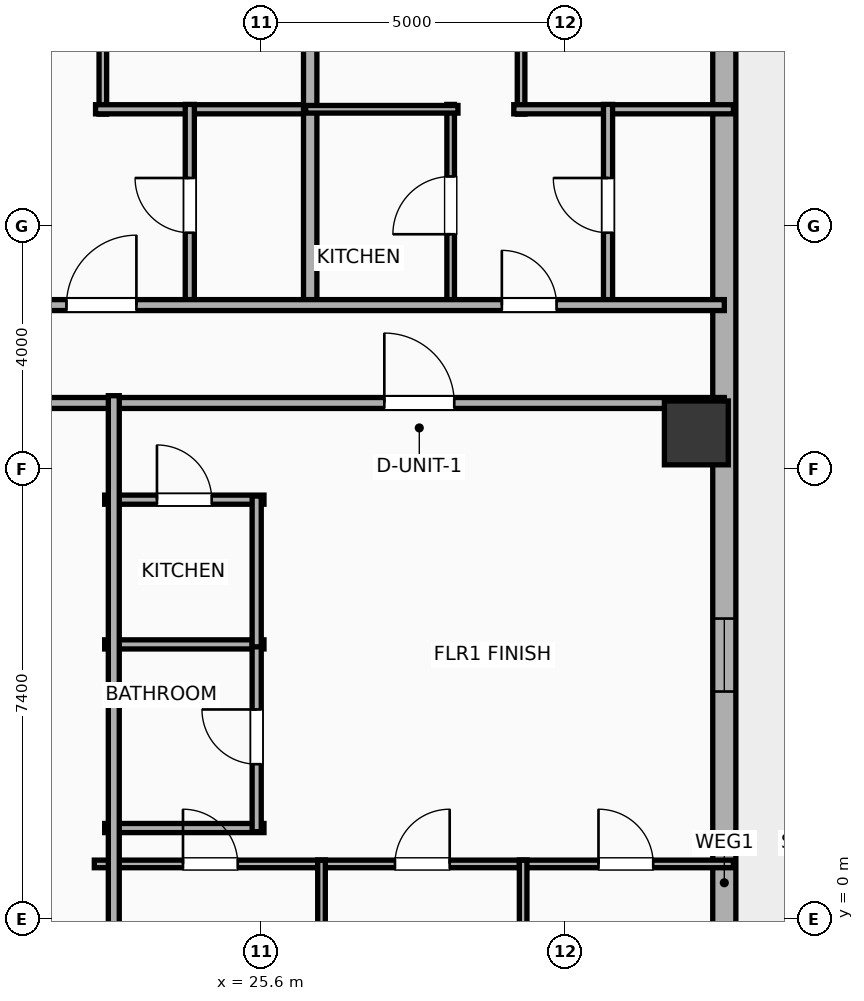
"""IFC4 building model, lengths in metres.
Left out: names, types, materials, properties, quantities, classifications, styles, units other than length and angle.
Written with IfcOpenShell. Run it as: python <this file> out.ifc"""

import sys

from ifc_helpers import new_model, si_unit, direction, frame, frame_2d, origin, origin_2d, place, context, subcontext, project, spatial, rectangle, hollow_rectangle, extrude, element, fill, save


model = new_model("IFC4")
c1 = context("Model", 3, precision=1e-05, world=origin(), true_north=direction((0.0, 1.0)))
c2 = subcontext(c1, "Body", "Model", "MODEL_VIEW")
j1 = project(units=[si_unit("LENGTHUNIT", "METRE"), si_unit("PLANEANGLEUNIT", "RADIAN")], contexts=[c1])
p1 = place(None, origin())
s1 = spatial("IfcSite", under=j1, at=p1, CompositionType="ELEMENT")
p2 = place(p1, origin())
s2 = spatial("IfcBuilding", under=s1, at=p2, CompositionType="ELEMENT")
p3 = place(p2, frame((0.0, 0.0, 113.1)))
s3 = spatial("IfcBuildingStorey", under=s2, at=p3, CompositionType="ELEMENT", Elevation=113.1)
p4 = place(p3, frame((32.75, 7.998, 0.0), z_axis=(0.0, 0.0, 1.0), x_axis=(1.0, 0.0, 0.0)))
e1 = element("IfcColumn", 1, at=p4, inside=s3, PredefinedType="COLUMN", context=c2, shape_type="SweptSolid", body=[
    extrude(hollow_rectangle(XDim=1.05, YDim=1.05, WallThickness=0.036, at=origin_2d()), origin(), (0.0, 0.0, 1.0), 3.9),
])
p5 = place(p3, frame((33.21, 17.781, 0.0), z_axis=(0.0, 0.0, 1.0), x_axis=(0.0, -1.0, 0.0)))
e2 = element("IfcWall", 2, at=p5, inside=s3, PredefinedType="ELEMENTEDWALL", context=c2, shape_type="SweptSolid", body=[
    extrude(rectangle(XDim=34.363, YDim=0.38, at=frame_2d((17.181, 0.0))), origin(), (0.0, 0.0, 1.0), 3.65),
])
p6 = place(p5, frame((31.687, 0.0, 0.75)))
e3 = element("IfcOpeningElement", 3, at=p6, cuts=e2, PredefinedType="OPENING", context=c2, shape_type="SweptSolid", body=[
    extrude(rectangle(XDim=1.2, YDim=2.05, at=frame_2d((0.6, 1.025))), frame((0.0, 0.2, 0.0), z_axis=(0.0, -1.0, 0.0), x_axis=(1.0, 0.0, 0.0)), (0.0, 0.0, 1.0), 0.4),
])
p7 = place(p5, frame((12.836, 0.0, 0.75)))
e4 = element("IfcOpeningElement", 4, at=p7, cuts=e2, PredefinedType="OPENING", context=c2, shape_type="SweptSolid", body=[
    extrude(rectangle(XDim=1.2, YDim=2.05, at=frame_2d((0.6, 1.025))), frame((0.0, 0.2, 0.0), z_axis=(0.0, -1.0, 0.0), x_axis=(1.0, 0.0, 0.0)), (0.0, 0.0, 1.0), 0.4),
])
p8 = place(p5, frame((21.386, 0.0, 0.75)))
e5 = element("IfcOpeningElement", 5, at=p8, cuts=e2, PredefinedType="OPENING", context=c2, shape_type="SweptSolid", body=[
    extrude(rectangle(XDim=1.2, YDim=2.05, at=frame_2d((0.6, 1.025))), frame((0.0, 0.2, 0.0), z_axis=(0.0, -1.0, 0.0), x_axis=(1.0, 0.0, 0.0)), (0.0, 0.0, 1.0), 0.4),
])
p9 = place(p3, frame((9.88, 8.49, 0.0), z_axis=(0.0, 0.0, 1.0), x_axis=(1.0, 0.0, 0.0)))
e6 = element("IfcWall", 6, at=p9, inside=s3, PredefinedType="PARTITIONING", context=c2, shape_type="SweptSolid", body=[
    extrude(rectangle(XDim=23.33, YDim=0.18, at=frame_2d((11.665, 0.0))), origin(), (0.0, 0.0, 1.0), 3.65),
])
p10 = place(p9, frame((17.739, 0.0, 0.0)))
e7 = element("IfcOpeningElement", 7, at=p10, cuts=e6, PredefinedType="OPENING", context=c2, shape_type="SweptSolid", body=[
    extrude(rectangle(XDim=1.15, YDim=2.05, at=frame_2d((0.575, 1.025))), frame((0.0, 0.1, 0.0), z_axis=(0.0, -1.0, 0.0), x_axis=(1.0, 0.0, 0.0)), (0.0, 0.0, 1.0), 0.2),
])
p11 = place(p3, frame((22.99, 13.24, 0.0), z_axis=(0.0, 0.0, 1.0), x_axis=(0.0, 1.0, 0.0)))
e8 = element("IfcWall", 8, at=p11, inside=s3, PredefinedType="PARTITIONING", context=c2, shape_type="SweptSolid", body=[
    extrude(rectangle(XDim=8.52, YDim=0.125, at=frame_2d((4.26, 0.0))), origin(), (0.0, 0.0, 1.0), 3.65),
])
p12 = place(p11, frame((1.595, 0.0, 0.0)))
e9 = element("IfcOpeningElement", 9, at=p12, cuts=e8, PredefinedType="OPENING", context=c2, shape_type="SweptSolid", body=[
    extrude(rectangle(XDim=0.9, YDim=2.05, at=frame_2d((0.45, 1.025))), frame((0.0, 0.073, 0.0), z_axis=(0.0, -1.0, 0.0), x_axis=(1.0, 0.0, 0.0)), (0.0, 0.0, 1.0), 0.145),
])
p13 = place(p3, frame((22.87, 13.32, 0.0), z_axis=(0.0, 0.0, 1.0), x_axis=(1.0, 0.0, 0.0)))
e10 = element("IfcWall", 10, at=p13, inside=s3, PredefinedType="PLUMBINGWALL", context=c2, shape_type="SweptSolid", body=[
    extrude(rectangle(XDim=3.605, YDim=0.15, at=frame_2d((1.802, 0.0))), origin(), (0.0, 0.0, 1.0), 3.65),
])
p14 = place(p3, frame((24.42, 10.08, 0.0), z_axis=(0.0, 0.0, 1.0), x_axis=(0.0, 1.0, 0.0)))
e11 = element("IfcWall", 11, at=p14, inside=s3, PredefinedType="PLUMBINGWALL", context=c2, shape_type="SweptSolid", body=[
    extrude(rectangle(XDim=3.32, YDim=0.15, at=frame_2d((1.66, 0.0))), origin(), (0.0, 0.0, 1.0), 3.65),
])
p15 = place(p14, frame((1.21, 0.0, 0.0)))
e12 = element("IfcOpeningElement", 12, at=p15, cuts=e11, PredefinedType="OPENING", context=c2, shape_type="SweptSolid", body=[
    extrude(rectangle(XDim=0.9, YDim=2.05, at=frame_2d((0.45, 1.025))), frame((0.0, 0.085, 0.0), z_axis=(0.0, -1.0, 0.0), x_axis=(1.0, 0.0, 0.0)), (0.0, 0.0, 1.0), 0.17),
])
p16 = place(p3, frame((26.4, 10.02, 0.0), z_axis=(0.0, 0.0, 1.0), x_axis=(0.0, 1.0, 0.0)))
e13 = element("IfcWall", 13, at=p16, inside=s3, PredefinedType="PARTITIONING", context=c2, shape_type="SweptSolid", body=[
    extrude(rectangle(XDim=11.59, YDim=0.22, at=frame_2d((5.795, 0.0))), origin(), (0.0, 0.0, 1.0), 3.65),
])
p17 = place(p3, frame((29.868, 13.24, 0.0), z_axis=(0.0, 0.0, 1.0), x_axis=(0.0, 1.0, 0.0)))
e14 = element("IfcWall", 14, at=p17, inside=s3, PredefinedType="PARTITIONING", context=c2, shape_type="SweptSolid", body=[
    extrude(rectangle(XDim=8.426, YDim=0.125, at=frame_2d((4.213, 0.0))), origin(), (0.0, 0.0, 1.0), 3.65),
])
p18 = place(p17, frame((1.572, 0.0, 0.0)))
e15 = element("IfcOpeningElement", 15, at=p18, cuts=e14, PredefinedType="OPENING", context=c2, shape_type="SweptSolid", body=[
    extrude(rectangle(XDim=0.9, YDim=2.05, at=frame_2d((0.45, 1.025))), frame((0.0, 0.073, 0.0), z_axis=(0.0, -1.0, 0.0), x_axis=(1.0, 0.0, 0.0)), (0.0, 0.0, 1.0), 0.145),
])
p19 = place(p3, frame((29.748, 13.32, 0.0), z_axis=(0.0, 0.0, 1.0), x_axis=(1.0, 0.0, 0.0)))
e16 = element("IfcWall", 16, at=p19, inside=s3, PredefinedType="PLUMBINGWALL", context=c2, shape_type="SweptSolid", body=[
    extrude(rectangle(XDim=3.612, YDim=0.15, at=frame_2d((1.806, 0.0))), origin(), (0.0, 0.0, 1.0), 3.65),
])
p20 = place(p3, frame((28.71, 10.08, 0.0), z_axis=(0.0, 0.0, 1.0), x_axis=(0.0, 1.0, 0.0)))
e17 = element("IfcWall", 17, at=p20, inside=s3, PredefinedType="PARTITIONING", context=c2, shape_type="SweptSolid", body=[
    extrude(rectangle(XDim=3.32, YDim=0.125, at=frame_2d((1.66, 0.0))), origin(), (0.0, 0.0, 1.0), 3.65),
])
p21 = place(p20, frame((1.185, 0.0, 0.0)))
e18 = element("IfcOpeningElement", 18, at=p21, cuts=e17, PredefinedType="OPENING", context=c2, shape_type="SweptSolid", body=[
    extrude(rectangle(XDim=0.95, YDim=2.05, at=frame_2d((0.475, 1.025))), frame((0.0, 0.073, 0.0), z_axis=(0.0, -1.0, 0.0), x_axis=(1.0, 0.0, 0.0)), (0.0, 0.0, 1.0), 0.145),
])
p22 = place(p3, frame((26.325, 13.32, 0.0), z_axis=(0.0, 0.0, 1.0), x_axis=(1.0, 0.0, 0.0)))
e19 = element("IfcWall", 19, at=p22, inside=s3, PredefinedType="PARTITIONING", context=c2, shape_type="SweptSolid", body=[
    extrude(rectangle(XDim=2.505, YDim=0.125, at=frame_2d((1.252, 0.0))), origin(), (0.0, 0.0, 1.0), 3.65),
])
p23 = place(p3, frame((31.298, 10.08, 0.0), z_axis=(0.0, 0.0, 1.0), x_axis=(0.0, 1.0, 0.0)))
e20 = element("IfcWall", 20, at=p23, inside=s3, PredefinedType="PLUMBINGWALL", context=c2, shape_type="SweptSolid", body=[
    extrude(rectangle(XDim=3.32, YDim=0.15, at=frame_2d((1.66, 0.0))), origin(), (0.0, 0.0, 1.0), 3.65),
])
p24 = place(p23, frame((1.21, 0.0, 0.0)))
e21 = element("IfcOpeningElement", 21, at=p24, cuts=e20, PredefinedType="OPENING", context=c2, shape_type="SweptSolid", body=[
    extrude(rectangle(XDim=0.9, YDim=2.05, at=frame_2d((0.45, 1.025))), frame((0.0, 0.085, 0.0), z_axis=(0.0, -1.0, 0.0), x_axis=(1.0, 0.0, 0.0)), (0.0, 0.0, 1.0), 0.17),
])
p25 = place(p3, frame((-29.21, 10.1, 0.0), z_axis=(0.0, 0.0, 1.0), x_axis=(1.0, 0.0, 0.0)))
e22 = element("IfcWall", 22, at=p25, inside=s3, PredefinedType="PARTITIONING", context=c2, shape_type="SweptSolid", body=[
    extrude(rectangle(XDim=62.42, YDim=0.18, at=frame_2d((31.21, 0.0))), origin(), (0.0, 0.0, 1.0), 3.65),
])
p26 = place(p25, frame((2.74, 0.0, 0.0)))
e23 = element("IfcOpeningElement", 23, at=p26, cuts=e22, PredefinedType="OPENING", context=c2, shape_type="SweptSolid", body=[
    extrude(rectangle(XDim=0.9, YDim=2.05, at=frame_2d((0.45, 1.025))), frame((0.0, 0.1, 0.0), z_axis=(0.0, -1.0, 0.0), x_axis=(1.0, 0.0, 0.0)), (0.0, 0.0, 1.0), 0.2),
])
p27 = place(p25, frame((9.868, 0.0, 0.0)))
e24 = element("IfcOpeningElement", 24, at=p27, cuts=e22, PredefinedType="OPENING", context=c2, shape_type="SweptSolid", body=[
    extrude(rectangle(XDim=1.15, YDim=2.05, at=frame_2d((0.575, 1.025))), frame((0.0, 0.1, 0.0), z_axis=(0.0, -1.0, 0.0), x_axis=(1.0, 0.0, 0.0)), (0.0, 0.0, 1.0), 0.2),
])
p28 = place(p25, frame((15.598, 0.0, 0.0)))
e25 = element("IfcOpeningElement", 25, at=p28, cuts=e22, PredefinedType="OPENING", context=c2, shape_type="SweptSolid", body=[
    extrude(rectangle(XDim=1.15, YDim=2.05, at=frame_2d((0.575, 1.025))), frame((0.0, 0.1, 0.0), z_axis=(0.0, -1.0, 0.0), x_axis=(1.0, 0.0, 0.0)), (0.0, 0.0, 1.0), 0.2),
])
p29 = place(p25, frame((22.801, 0.0, 0.0)))
e26 = element("IfcOpeningElement", 26, at=p29, cuts=e22, PredefinedType="OPENING", context=c2, shape_type="SweptSolid", body=[
    extrude(rectangle(XDim=1.15, YDim=2.05, at=frame_2d((0.575, 1.025))), frame((0.0, 0.1, 0.0), z_axis=(0.0, -1.0, 0.0), x_axis=(1.0, 0.0, 0.0)), (0.0, 0.0, 1.0), 0.2),
])
p30 = place(p25, frame((29.998, 0.0, 0.0)))
e27 = element("IfcOpeningElement", 27, at=p30, cuts=e22, PredefinedType="OPENING", context=c2, shape_type="SweptSolid", body=[
    extrude(rectangle(XDim=1.15, YDim=2.05, at=frame_2d((0.575, 1.025))), frame((0.0, 0.1, 0.0), z_axis=(0.0, -1.0, 0.0), x_axis=(1.0, 0.0, 0.0)), (0.0, 0.0, 1.0), 0.2),
])
p31 = place(p25, frame((37.202, 0.0, 0.0)))
e28 = element("IfcOpeningElement", 28, at=p31, cuts=e22, PredefinedType="OPENING", context=c2, shape_type="SweptSolid", body=[
    extrude(rectangle(XDim=1.15, YDim=2.05, at=frame_2d((0.575, 1.025))), frame((0.0, 0.1, 0.0), z_axis=(0.0, -1.0, 0.0), x_axis=(1.0, 0.0, 0.0)), (0.0, 0.0, 1.0), 0.2),
])
p32 = place(p25, frame((44.399, 0.0, 0.0)))
e29 = element("IfcOpeningElement", 29, at=p32, cuts=e22, PredefinedType="OPENING", context=c2, shape_type="SweptSolid", body=[
    extrude(rectangle(XDim=1.15, YDim=2.05, at=frame_2d((0.575, 1.025))), frame((0.0, 0.1, 0.0), z_axis=(0.0, -1.0, 0.0), x_axis=(1.0, 0.0, 0.0)), (0.0, 0.0, 1.0), 0.2),
])
p33 = place(p25, frame((51.602, 0.0, 0.0)))
e30 = element("IfcOpeningElement", 30, at=p33, cuts=e22, PredefinedType="OPENING", context=c2, shape_type="SweptSolid", body=[
    extrude(rectangle(XDim=1.15, YDim=2.05, at=frame_2d((0.575, 1.025))), frame((0.0, 0.1, 0.0), z_axis=(0.0, -1.0, 0.0), x_axis=(1.0, 0.0, 0.0)), (0.0, 0.0, 1.0), 0.2),
])
p34 = place(p25, frame((58.762, 0.0, 0.0)))
e31 = element("IfcOpeningElement", 31, at=p34, cuts=e22, PredefinedType="OPENING", context=c2, shape_type="SweptSolid", body=[
    extrude(rectangle(XDim=0.9, YDim=2.05, at=frame_2d((0.45, 1.025))), frame((0.0, 0.1, 0.0), z_axis=(0.0, -1.0, 0.0), x_axis=(1.0, 0.0, 0.0)), (0.0, 0.0, 1.0), 0.2),
])
p35 = place(p3, frame((23.02, 6.9, 0.0), z_axis=(0.0, 0.0, 1.0), x_axis=(1.0, 0.0, 0.0)))
e32 = element("IfcWall", 32, at=p35, inside=s3, PredefinedType="PLUMBINGWALL", context=c2, shape_type="SweptSolid", body=[
    extrude(rectangle(XDim=2.62, YDim=0.15, at=frame_2d((1.31, 0.0))), origin(), (0.0, 0.0, 1.0), 3.65),
])
p36 = place(p35, frame((0.86, 0.0, 0.0)))
e33 = element("IfcOpeningElement", 33, at=p36, cuts=e32, PredefinedType="OPENING", context=c2, shape_type="SweptSolid", body=[
    extrude(rectangle(XDim=0.9, YDim=2.05, at=frame_2d((0.45, 1.025))), frame((0.0, 0.085, 0.0), z_axis=(0.0, -1.0, 0.0), x_axis=(1.0, 0.0, 0.0)), (0.0, 0.0, 1.0), 0.17),
])
for number, where, z_axis, x_axis in (
    (34, (23.02, 4.52, 0.0), (0.0, 0.0, 1.0), (1.0, 0.0, 0.0)),
    (35, (23.02, 1.5, 0.0), (0.0, 0.0, 1.0), (1.0, 0.0, 0.0)),
):
    element("IfcWall", number, at=place(p3, frame(where, z_axis=z_axis, x_axis=x_axis)), inside=s3, PredefinedType="PLUMBINGWALL", context=c2, shape_type="SweptSolid", body=[
        extrude(rectangle(XDim=2.62, YDim=0.15, at=frame_2d((1.31, 0.0))), origin(), (0.0, 0.0, 1.0), 3.65),
    ])
p37 = place(p3, frame((25.52, 1.44, 0.0), z_axis=(0.0, 0.0, 1.0), x_axis=(0.0, 1.0, 0.0)))
e36 = element("IfcWall", 36, at=p37, inside=s3, PredefinedType="PLUMBINGWALL", context=c2, shape_type="SweptSolid", body=[
    extrude(rectangle(XDim=3.12, YDim=0.15, at=frame_2d((1.56, 0.0))), origin(), (0.0, 0.0, 1.0), 3.65),
])
p38 = place(p37, frame((1.11, 0.0, 0.0)))
e37 = element("IfcOpeningElement", 37, at=p38, cuts=e36, PredefinedType="OPENING", context=c2, shape_type="SweptSolid", body=[
    extrude(rectangle(XDim=0.9, YDim=2.05, at=frame_2d((0.45, 1.025))), frame((0.0, 0.085, 0.0), z_axis=(0.0, -1.0, 0.0), x_axis=(1.0, 0.0, 0.0)), (0.0, 0.0, 1.0), 0.17),
])
p39 = place(p3, frame((25.52, 4.48, 0.0), z_axis=(0.0, 0.0, 1.0), x_axis=(0.0, 1.0, 0.0)))
e38 = element("IfcWall", 38, at=p39, inside=s3, PredefinedType="PLUMBINGWALL", context=c2, shape_type="SweptSolid", body=[
    extrude(rectangle(XDim=2.48, YDim=0.15, at=frame_2d((1.24, 0.0))), origin(), (0.0, 0.0, 1.0), 3.65),
])
p40 = place(p3, frame((22.85, 0.91, 0.0), z_axis=(0.0, 0.0, 1.0), x_axis=(1.0, 0.0, 0.0)))
e39 = element("IfcWall", 39, at=p40, inside=s3, PredefinedType="PARTITIONING", context=c2, shape_type="SweptSolid", body=[
    extrude(rectangle(XDim=3.798, YDim=0.125, at=frame_2d((1.899, 0.0))), origin(), (0.0, 0.0, 1.0), 3.65),
])
p41 = place(p40, frame((1.458, 0.0, 0.0)))
e40 = element("IfcOpeningElement", 40, at=p41, cuts=e39, PredefinedType="OPENING", context=c2, shape_type="SweptSolid", body=[
    extrude(rectangle(XDim=0.9, YDim=2.05, at=frame_2d((0.45, 1.025))), frame((0.0, 0.073, 0.0), z_axis=(0.0, -1.0, 0.0), x_axis=(1.0, 0.0, 0.0)), (0.0, 0.0, 1.0), 0.145),
])
p42 = place(p3, frame((26.523, 0.91, 0.0), z_axis=(0.0, 0.0, 1.0), x_axis=(1.0, 0.0, 0.0)))
e41 = element("IfcWall", 41, at=p42, inside=s3, PredefinedType="PARTITIONING", context=c2, shape_type="SweptSolid", body=[
    extrude(rectangle(XDim=3.441, YDim=0.125, at=frame_2d((1.721, 0.0))), origin(), (0.0, 0.0, 1.0), 3.65),
])
p43 = place(p42, frame((1.271, 0.0, 0.0)))
e42 = element("IfcOpeningElement", 42, at=p43, cuts=e41, PredefinedType="OPENING", context=c2, shape_type="SweptSolid", body=[
    extrude(rectangle(XDim=0.9, YDim=2.05, at=frame_2d((0.45, 1.025))), frame((0.0, 0.073, 0.0), z_axis=(0.0, -1.0, 0.0), x_axis=(1.0, 0.0, 0.0)), (0.0, 0.0, 1.0), 0.145),
])
p44 = place(p3, frame((29.84, 0.91, 0.0), z_axis=(0.0, 0.0, 1.0), x_axis=(1.0, 0.0, 0.0)))
e43 = element("IfcWall", 43, at=p44, inside=s3, PredefinedType="PARTITIONING", context=c2, shape_type="SweptSolid", body=[
    extrude(rectangle(XDim=3.521, YDim=0.125, at=frame_2d((1.76, 0.0))), origin(), (0.0, 0.0, 1.0), 3.65),
])
p45 = place(p44, frame((1.302, 0.0, 0.0)))
e44 = element("IfcOpeningElement", 44, at=p45, cuts=e43, PredefinedType="OPENING", context=c2, shape_type="SweptSolid", body=[
    extrude(rectangle(XDim=0.9, YDim=2.05, at=frame_2d((0.45, 1.025))), frame((0.0, 0.073, 0.0), z_axis=(0.0, -1.0, 0.0), x_axis=(1.0, 0.0, 0.0)), (0.0, 0.0, 1.0), 0.145),
])
for number, where, z_axis, x_axis in (
    (45, (29.902, -8.81, 0.0), (0.0, 0.0, 1.0), (0.0, 1.0, 0.0)),
    (46, (26.586, -8.81, 0.0), (0.0, 0.0, 1.0), (0.0, 1.0, 0.0)),
):
    element("IfcWall", number, at=place(p3, frame(where, z_axis=z_axis, x_axis=x_axis)), inside=s3, PredefinedType="PARTITIONING", context=c2, shape_type="SweptSolid", body=[
        extrude(rectangle(XDim=9.78, YDim=0.125, at=frame_2d((4.89, 0.0))), origin(), (0.0, 0.0, 1.0), 3.65),
    ])
p46 = place(p3, frame((23.17, -8.61, 0.0), z_axis=(0.0, 0.0, 1.0), x_axis=(0.0, 1.0, 0.0)))
e47 = element("IfcWall", 47, at=p46, inside=s3, PredefinedType="PARTITIONING", context=c2, shape_type="SweptSolid", body=[
    extrude(rectangle(XDim=17.22, YDim=0.18, at=frame_2d((8.61, 0.0))), origin(), (0.0, 0.0, 1.0), 3.65),
])
p47 = place(p7, origin())
e48 = element("IfcWindow", 48, at=p47, inside=s3, PartitioningType="SINGLE_PANEL", PredefinedType="WINDOW", context=c2, shape_type="SweptSolid", body=[
    extrude(rectangle(XDim=1.2, YDim=2.05, at=frame_2d((0.6, 1.025))), frame((0.0, 0.03, 0.0), z_axis=(0.0, -1.0, 0.0), x_axis=(1.0, 0.0, 0.0)), (0.0, 0.0, 1.0), 0.06),
])
fill(e4, e48)
p48 = place(p10, origin())
e49 = element("IfcDoor", 49, at=p48, inside=s3, OperationType="SINGLE_SWING_LEFT", PredefinedType="DOOR", context=c2, shape_type="SweptSolid", body=[
    extrude(rectangle(XDim=1.15, YDim=2.05, at=frame_2d((0.575, 1.025))), frame((0.0, 0.025, 0.0), z_axis=(0.0, -1.0, 0.0), x_axis=(1.0, 0.0, 0.0)), (0.0, 0.0, 1.0), 0.05),
])
fill(e7, e49)
p49 = place(p15, origin())
e50 = element("IfcDoor", 50, at=p49, inside=s3, OperationType="SINGLE_SWING_RIGHT", PredefinedType="DOOR", context=c2, shape_type="SweptSolid", body=[
    extrude(rectangle(XDim=0.9, YDim=2.05, at=frame_2d((0.45, 1.025))), frame((0.0, 0.025, 0.0), z_axis=(0.0, -1.0, 0.0), x_axis=(1.0, 0.0, 0.0)), (0.0, 0.0, 1.0), 0.05),
])
fill(e12, e50)
p50 = place(p21, origin())
e51 = element("IfcDoor", 51, at=p50, inside=s3, OperationType="SINGLE_SWING_LEFT", PredefinedType="DOOR", context=c2, shape_type="SweptSolid", body=[
    extrude(rectangle(XDim=0.95, YDim=2.05, at=frame_2d((0.475, 1.025))), frame((0.0, 0.025, 0.0), z_axis=(0.0, -1.0, 0.0), x_axis=(1.0, 0.0, 0.0)), (0.0, 0.0, 1.0), 0.05),
])
fill(e18, e51)
p51 = place(p24, origin())
e52 = element("IfcDoor", 52, at=p51, inside=s3, OperationType="SINGLE_SWING_RIGHT", PredefinedType="DOOR", context=c2, shape_type="SweptSolid", body=[
    extrude(rectangle(XDim=0.9, YDim=2.05, at=frame_2d((0.45, 1.025))), frame((0.0, 0.025, 0.0), z_axis=(0.0, -1.0, 0.0), x_axis=(1.0, 0.0, 0.0)), (0.0, 0.0, 1.0), 0.05),
])
fill(e21, e52)
p52 = place(p33, origin())
e53 = element("IfcDoor", 53, at=p52, inside=s3, OperationType="SINGLE_SWING_RIGHT", PredefinedType="DOOR", context=c2, shape_type="SweptSolid", body=[
    extrude(rectangle(XDim=1.15, YDim=2.05, at=frame_2d((0.575, 1.025))), frame((0.0, 0.025, 0.0), z_axis=(0.0, -1.0, 0.0), x_axis=(1.0, 0.0, 0.0)), (0.0, 0.0, 1.0), 0.05),
])
fill(e30, e53)
p53 = place(p34, origin())
e54 = element("IfcDoor", 54, at=p53, inside=s3, OperationType="SINGLE_SWING_LEFT", PredefinedType="DOOR", context=c2, shape_type="SweptSolid", body=[
    extrude(rectangle(XDim=0.9, YDim=2.05, at=frame_2d((0.45, 1.025))), frame((0.0, 0.025, 0.0), z_axis=(0.0, -1.0, 0.0), x_axis=(1.0, 0.0, 0.0)), (0.0, 0.0, 1.0), 0.05),
])
fill(e31, e54)
p54 = place(p36, origin())
e55 = element("IfcDoor", 55, at=p54, inside=s3, OperationType="SINGLE_SWING_LEFT", PredefinedType="DOOR", context=c2, shape_type="SweptSolid", body=[
    extrude(rectangle(XDim=0.9, YDim=2.05, at=frame_2d((0.45, 1.025))), frame((0.0, 0.025, 0.0), z_axis=(0.0, -1.0, 0.0), x_axis=(1.0, 0.0, 0.0)), (0.0, 0.0, 1.0), 0.05),
])
fill(e33, e55)
p55 = place(p38, origin())
e56 = element("IfcDoor", 56, at=p55, inside=s3, OperationType="SINGLE_SWING_RIGHT", PredefinedType="DOOR", context=c2, shape_type="SweptSolid", body=[
    extrude(rectangle(XDim=0.9, YDim=2.05, at=frame_2d((0.45, 1.025))), frame((0.0, 0.025, 0.0), z_axis=(0.0, -1.0, 0.0), x_axis=(1.0, 0.0, 0.0)), (0.0, 0.0, 1.0), 0.05),
])
fill(e37, e56)
p56 = place(p41, origin())
e57 = element("IfcDoor", 57, at=p56, inside=s3, OperationType="SINGLE_SWING_LEFT", PredefinedType="DOOR", context=c2, shape_type="SweptSolid", body=[
    extrude(rectangle(XDim=0.9, YDim=2.05, at=frame_2d((0.45, 1.025))), frame((0.0, 0.025, 0.0), z_axis=(0.0, -1.0, 0.0), x_axis=(1.0, 0.0, 0.0)), (0.0, 0.0, 1.0), 0.05),
])
fill(e40, e57)
p57 = place(p43, origin())
e58 = element("IfcDoor", 58, at=p57, inside=s3, OperationType="SINGLE_SWING_RIGHT", PredefinedType="DOOR", context=c2, shape_type="SweptSolid", body=[
    extrude(rectangle(XDim=0.9, YDim=2.05, at=frame_2d((0.45, 1.025))), frame((0.0, 0.025, 0.0), z_axis=(0.0, -1.0, 0.0), x_axis=(1.0, 0.0, 0.0)), (0.0, 0.0, 1.0), 0.05),
])
fill(e42, e58)
p58 = place(p45, origin())
e59 = element("IfcDoor", 59, at=p58, inside=s3, OperationType="SINGLE_SWING_LEFT", PredefinedType="DOOR", context=c2, shape_type="SweptSolid", body=[
    extrude(rectangle(XDim=0.9, YDim=2.05, at=frame_2d((0.45, 1.025))), frame((0.0, 0.025, 0.0), z_axis=(0.0, -1.0, 0.0), x_axis=(1.0, 0.0, 0.0)), (0.0, 0.0, 1.0), 0.05),
])
fill(e44, e59)
save(model, sys.argv[1])
